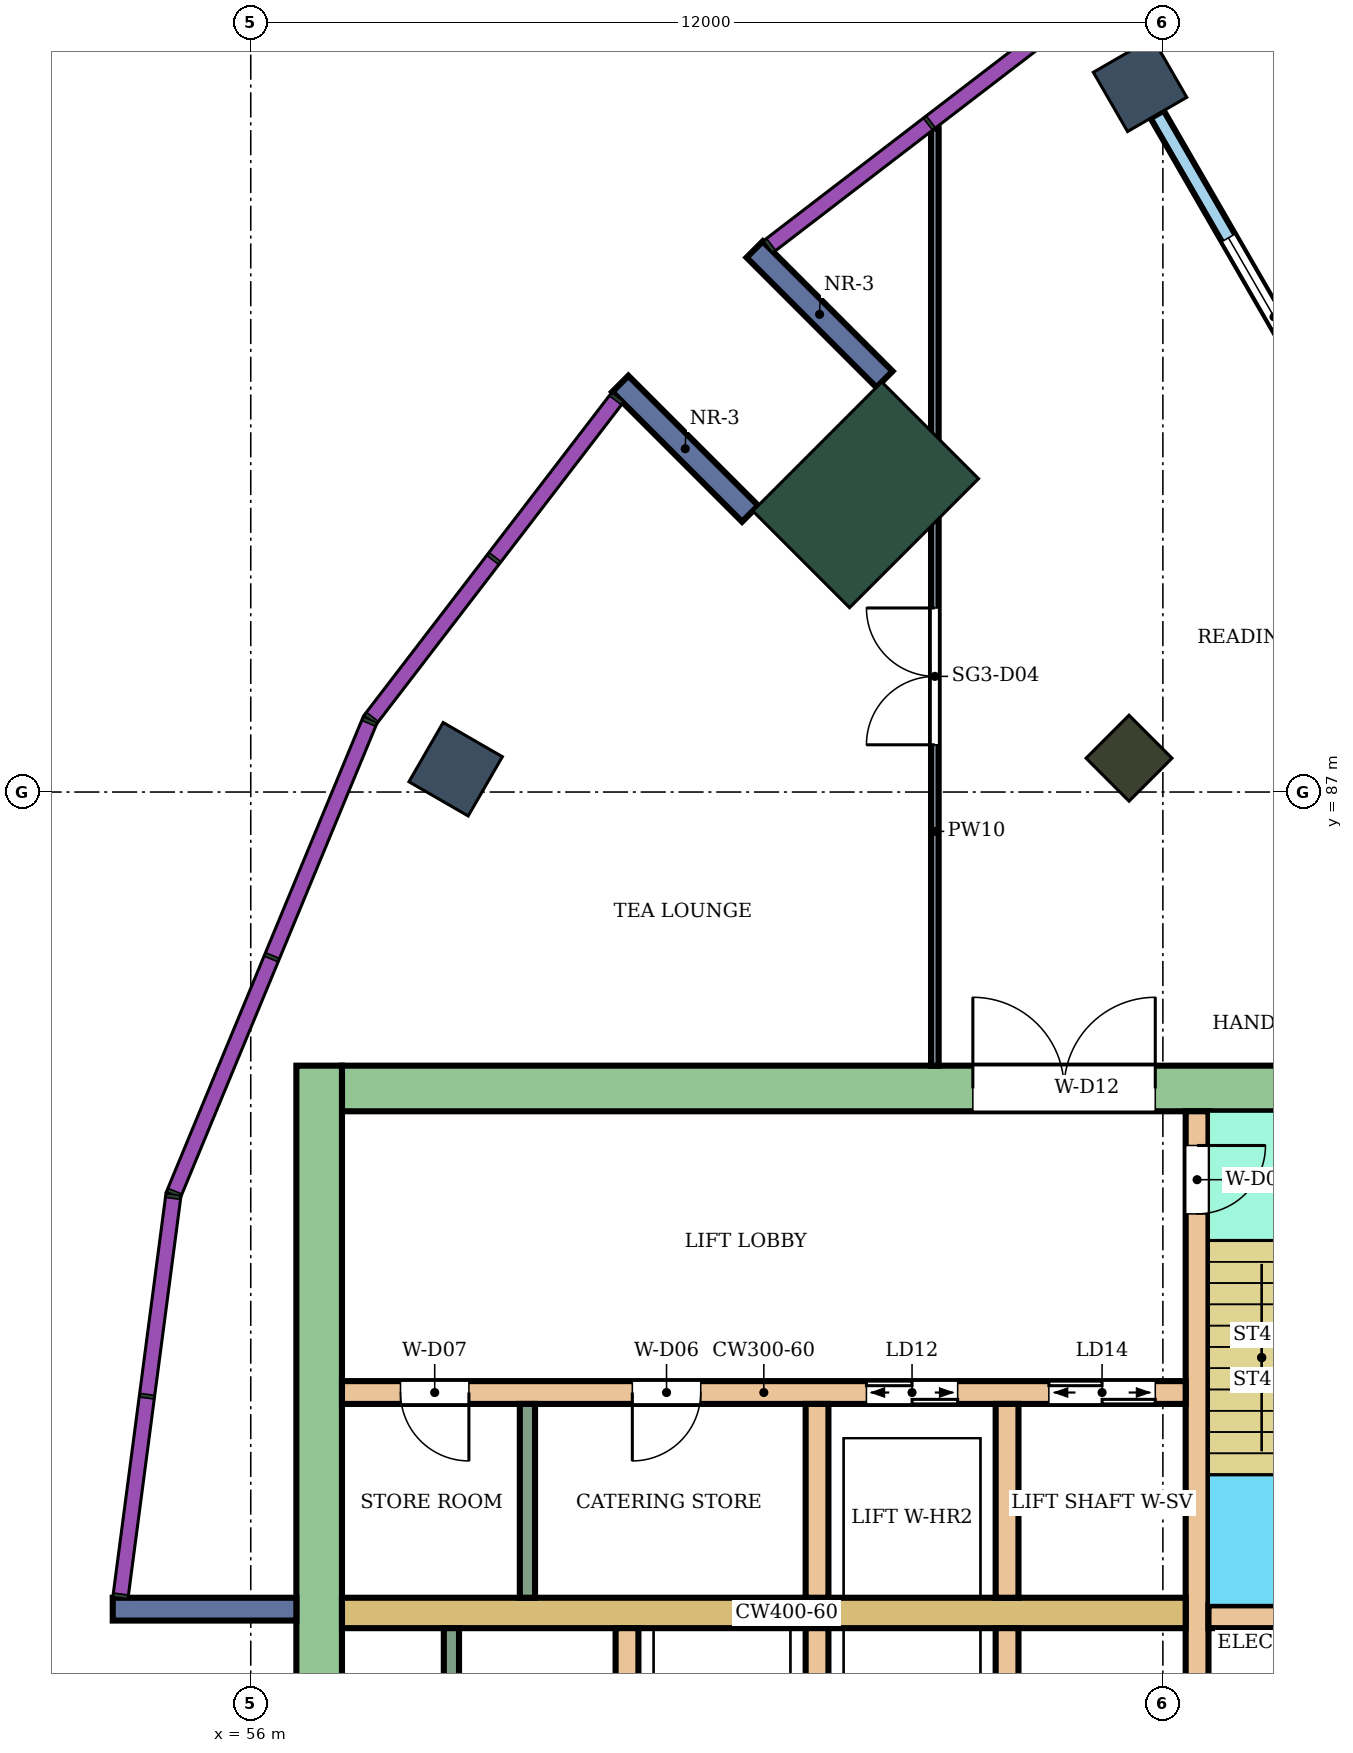
"""IFC4 building model, lengths in metres.
Left out: names, types, materials, properties, quantities, classifications, styles, units other than length and angle.
Written with IfcOpenShell. Run it as: python <this file> out.ifc"""

import sys

from ifc_helpers import new_model, si_unit, direction, frame, frame_2d, origin, origin_2d, place, context, subcontext, project, spatial, rectangle, extrude, element, fill, save


model = new_model("IFC4")
c1 = context("Model", 3, precision=1e-05, world=origin(), true_north=direction((0.0, 1.0)))
c2 = subcontext(c1, "Body", "Model", "MODEL_VIEW")
j1 = project(units=[si_unit("LENGTHUNIT", "METRE"), si_unit("PLANEANGLEUNIT", "RADIAN")], contexts=[c1])
p1 = place(None, origin())
s1 = spatial("IfcSite", under=j1, at=p1, CompositionType="ELEMENT")
p2 = place(p1, origin())
s2 = spatial("IfcBuilding", under=s1, at=p2, CompositionType="ELEMENT")
p3 = place(p2, frame((0.0, 0.0, 229.3)))
s3 = spatial("IfcBuildingStorey", under=s2, at=p3, CompositionType="ELEMENT", Elevation=229.3)
for number, where, z_axis, x_axis in (
    (1, (67.7, 96.304, 0.0), (0.0, 0.0, 1.0), (-0.5, 0.866, 0.0)),
    (2, (58.696, 87.3, 0.0), (0.0, 0.0, 1.0), (-0.866, 0.5, 0.0)),
):
    element("IfcColumn", number, at=place(p3, frame(where, z_axis=z_axis, x_axis=x_axis)), inside=s3, PredefinedType="COLUMN", context=c2, shape_type="SweptSolid", body=[
        extrude(rectangle(XDim=0.9, YDim=0.9, at=origin_2d()), origin(), (0.0, 0.0, 1.0), 8.0),
    ])
p4 = place(p3, frame((67.555, 87.445, 0.0), z_axis=(0.0, 0.0, 1.0), x_axis=(-0.707106781187, 0.707106781187, 0.0)))
e3 = element("IfcColumn", 3, at=p4, inside=s3, PredefinedType="COLUMN", context=c2, shape_type="SweptSolid", body=[
    extrude(rectangle(XDim=0.8, YDim=0.8, at=origin_2d()), origin(), (0.0, 0.0, 1.0), 8.0),
])
p5 = place(p3, frame((64.09, 90.91, 0.0), z_axis=(0.0, 0.0, 1.0), x_axis=(-0.707106781187, 0.707106781187, 0.0)))
e4 = element("IfcColumn", 4, at=p5, inside=s3, PredefinedType="COLUMN", context=c2, shape_type="SweptSolid", body=[
    extrude(rectangle(XDim=1.8, YDim=2.4, at=origin_2d()), origin(), (0.0, 0.0, 1.0), 8.0),
])
p6 = place(p3, frame((72.1, 83.1, 0.0), z_axis=(0.0, 0.0, 1.0), x_axis=(-1.0, 0.0, 0.0)))
e5 = element("IfcWall", 5, at=p6, inside=s3, PredefinedType="SHEAR", context=c2, shape_type="SweptSolid", body=[
    extrude(rectangle(XDim=14.9, YDim=0.6, at=frame_2d((7.45, 0.0))), origin(), (0.0, 0.0, 1.0), 7.68),
])
p7 = place(p6, frame((4.2, 0.0, 0.0)))
e6 = element("IfcOpeningElement", 6, at=p7, cuts=e5, PredefinedType="OPENING", context=c2, shape_type="SweptSolid", body=[
    extrude(rectangle(XDim=2.4, YDim=2.4, at=frame_2d((1.2, 1.2))), frame((0.0, 0.31, 0.0), z_axis=(0.0, -1.0, 0.0), x_axis=(1.0, 0.0, 0.0)), (0.0, 0.0, 1.0), 0.62),
])
p8 = place(p3, frame((56.9, 83.4, 0.0), z_axis=(0.0, 0.0, 1.0), x_axis=(0.0, -1.0, 0.0)))
e7 = element("IfcWall", 7, at=p8, inside=s3, PredefinedType="SHEAR", context=c2, shape_type="SweptSolid", body=[
    extrude(rectangle(XDim=16.8, YDim=0.6, at=frame_2d((8.4, 0.0))), origin(), (0.0, 0.0, 1.0), 7.68),
])
p9 = place(p3, frame((68.45, 82.8, 0.0), z_axis=(0.0, 0.0, 1.0), x_axis=(0.0, -1.0, 0.0)))
e8 = element("IfcWall", 8, at=p9, inside=s3, PredefinedType="SHEAR", context=c2, shape_type="SweptSolid", body=[
    extrude(rectangle(XDim=7.8, YDim=0.3, at=frame_2d((3.9, 0.0))), origin(), (0.0, 0.0, 1.0), 7.68),
])
p10 = place(p9, frame((0.45, 0.0, 0.0)))
e9 = element("IfcOpeningElement", 9, at=p10, cuts=e8, PredefinedType="OPENING", context=c2, shape_type="SweptSolid", body=[
    extrude(rectangle(XDim=0.9, YDim=2.1, at=frame_2d((0.45, 1.05))), frame((0.0, 0.16, 0.0), z_axis=(0.0, -1.0, 0.0), x_axis=(1.0, 0.0, 0.0)), (0.0, 0.0, 1.0), 0.32),
])
p11 = place(p3, frame((71.65, 76.15, 0.0), z_axis=(0.0, 0.0, 1.0), x_axis=(-1.0, 0.0, 0.0)))
e10 = element("IfcWall", 10, at=p11, inside=s3, PredefinedType="SHEAR", context=c2, shape_type="SweptSolid", body=[
    extrude(rectangle(XDim=3.05, YDim=0.3, at=frame_2d((1.525, 0.0))), origin(), (0.0, 0.0, 1.0), 7.68),
])
p12 = place(p3, frame((68.3, 76.2, 0.0), z_axis=(0.0, 0.0, 1.0), x_axis=(-1.0, 0.0, 0.0)))
e11 = element("IfcWall", 11, at=p12, inside=s3, PredefinedType="SHEAR", context=c2, shape_type="SweptSolid", body=[
    extrude(rectangle(XDim=11.1, YDim=0.4, at=frame_2d((5.55, 0.0))), origin(), (0.0, 0.0, 1.0), 7.68),
])
p13 = place(p3, frame((68.3, 79.1, 0.0), z_axis=(0.0, 0.0, 1.0), x_axis=(-1.0, 0.0, 0.0)))
e12 = element("IfcWall", 12, at=p13, inside=s3, PredefinedType="SHEAR", context=c2, shape_type="SweptSolid", body=[
    extrude(rectangle(XDim=11.1, YDim=0.3, at=frame_2d((5.55, 0.0))), origin(), (0.0, 0.0, 1.0), 7.68),
])
p14 = place(p13, frame((0.4, 0.0, 0.0)))
e13 = element("IfcOpeningElement", 13, at=p14, cuts=e12, PredefinedType="OPENING", context=c2, shape_type="SweptSolid", body=[
    extrude(rectangle(XDim=1.4, YDim=2.1, at=frame_2d((0.7, 1.05))), frame((0.0, 0.16, 0.0), z_axis=(0.0, -1.0, 0.0), x_axis=(1.0, 0.0, 0.0)), (0.0, 0.0, 1.0), 0.32),
])
p15 = place(p13, frame((3.0, 0.0, 0.0)))
e14 = element("IfcOpeningElement", 14, at=p15, cuts=e12, PredefinedType="OPENING", context=c2, shape_type="SweptSolid", body=[
    extrude(rectangle(XDim=1.2, YDim=2.1, at=frame_2d((0.6, 1.05))), frame((0.0, 0.16, 0.0), z_axis=(0.0, -1.0, 0.0), x_axis=(1.0, 0.0, 0.0)), (0.0, 0.0, 1.0), 0.32),
])
p16 = place(p13, frame((6.38, 0.0, 0.0)))
e15 = element("IfcOpeningElement", 15, at=p16, cuts=e12, PredefinedType="OPENING", context=c2, shape_type="SweptSolid", body=[
    extrude(rectangle(XDim=0.9, YDim=2.1, at=frame_2d((0.45, 1.05))), frame((0.0, 0.16, 0.0), z_axis=(0.0, -1.0, 0.0), x_axis=(1.0, 0.0, 0.0)), (0.0, 0.0, 1.0), 0.32),
])
p17 = place(p13, frame((9.43, 0.0, 0.0)))
e16 = element("IfcOpeningElement", 16, at=p17, cuts=e12, PredefinedType="OPENING", context=c2, shape_type="SweptSolid", body=[
    extrude(rectangle(XDim=0.9, YDim=2.1, at=frame_2d((0.45, 1.05))), frame((0.0, 0.16, 0.0), z_axis=(0.0, -1.0, 0.0), x_axis=(1.0, 0.0, 0.0)), (0.0, 0.0, 1.0), 0.32),
])
for number, where, z_axis, x_axis in (
    (17, (65.95, 76.0, 0.0), (0.0, 0.0, 1.0), (0.0, -1.0, 0.0)),
    (18, (63.45, 76.0, 0.0), (0.0, 0.0, 1.0), (0.0, -1.0, 0.0)),
    (19, (60.95, 76.0, 0.0), (0.0, 0.0, 1.0), (0.0, -1.0, 0.0)),
    (20, (65.95, 78.95, 0.0), (0.0, 0.0, 1.0), (0.0, -1.0, 0.0)),
    (21, (63.45, 78.95, 0.0), (0.0, 0.0, 1.0), (0.0, -1.0, 0.0)),
):
    element("IfcWall", number, at=place(p3, frame(where, z_axis=z_axis, x_axis=x_axis)), inside=s3, PredefinedType="SHEAR", context=c2, shape_type="SweptSolid", body=[
        extrude(rectangle(XDim=2.55, YDim=0.3, at=frame_2d((1.275, 0.0))), origin(), (0.0, 0.0, 1.0), 7.68),
    ])
for number, where, z_axis, x_axis in (
    (22, (64.338, 92.43, 0.0), (0.0, 0.0, 1.0), (-0.707, 0.707, 0.0)),
    (23, (62.57, 90.662, 0.0), (0.0, 0.0, 1.0), (-0.707, 0.707, 0.0)),
    (24, (56.6, 76.25, 0.0), (0.0, 0.0, 1.0), (-1.0, 0.0, 0.0)),
):
    element("IfcWall", number, at=place(p3, frame(where, z_axis=z_axis, x_axis=x_axis)), inside=s3, PredefinedType="NOTDEFINED", context=c2, shape_type="SweptSolid", body=[
        extrude(rectangle(XDim=2.416, YDim=0.3, at=frame_2d((1.208, 0.0))), origin(), (0.0, 0.0, 1.0), 8.0),
    ])
p18 = place(p3, frame((71.0, 90.588, 0.0), z_axis=(0.0, 0.0, 1.0), x_axis=(-0.499985903289, 0.866033542371, 0.0)))
e25 = element("IfcWall", 25, at=p18, inside=s3, PredefinedType="NOTDEFINED", context=c2, shape_type="SweptSolid", body=[
    extrude(rectangle(XDim=6.15, YDim=0.2, at=frame_2d((3.075, 0.0))), origin(), (0.0, 0.0, 1.0), 8.0),
])
p19 = place(p18, frame((1.875, 0.0, 0.3)))
e26 = element("IfcOpeningElement", 26, at=p19, cuts=e25, PredefinedType="OPENING", context=c2, shape_type="SweptSolid", body=[
    extrude(rectangle(XDim=2.4, YDim=3.6, at=frame_2d((1.2, 1.8))), frame((0.0, 0.11, 0.0), z_axis=(0.0, -1.0, 0.0), x_axis=(1.0, 0.0, 0.0)), (0.0, 0.0, 1.0), 0.22),
])
p20 = place(p3, frame((65.0, 83.4, 0.0), z_axis=(0.0, 0.0, 1.0), x_axis=(0.0, 1.0, 0.0)))
e27 = element("IfcWall", 27, at=p20, inside=s3, PredefinedType="PARTITIONING", context=c2, shape_type="SweptSolid", body=[
    extrude(rectangle(XDim=12.33, YDim=0.1, at=frame_2d((6.165, 0.0))), origin(), (0.0, 0.0, 1.0), 7.55),
])
p21 = place(p20, frame((4.221, 0.0, 0.0)))
e28 = element("IfcOpeningElement", 28, at=p21, cuts=e27, PredefinedType="OPENING", context=c2, shape_type="SweptSolid", body=[
    extrude(rectangle(XDim=1.8, YDim=2.1, at=frame_2d((0.9, 1.05))), frame((0.0, 0.06, 0.0), z_axis=(0.0, -1.0, 0.0), x_axis=(1.0, 0.0, 0.0)), (0.0, 0.0, 1.0), 0.12),
])
for number, where, z_axis, x_axis in (
    (29, (58.64, 76.0, 0.0), (0.0, 0.0, 1.0), (0.0, -1.0, 0.0)),
    (30, (59.64, 78.95, 0.0), (0.0, 0.0, 1.0), (0.0, -1.0, 0.0)),
):
    element("IfcWall", number, at=place(p3, frame(where, z_axis=z_axis, x_axis=x_axis)), inside=s3, PredefinedType="PARTITIONING", context=c2, shape_type="SweptSolid", body=[
        extrude(rectangle(XDim=2.55, YDim=0.2, at=frame_2d((1.275, 0.0))), origin(), (0.0, 0.0, 1.0), 7.68),
    ])
p22 = place(p19, origin())
e31 = element("IfcWindow", 31, at=p22, inside=s3, PartitioningType="SINGLE_PANEL", PredefinedType="WINDOW", context=c2, shape_type="SweptSolid", body=[
    extrude(rectangle(XDim=2.4, YDim=3.6, at=frame_2d((1.2, 1.8))), frame((0.0, 0.03, 0.0), z_axis=(0.0, -1.0, 0.0), x_axis=(1.0, 0.0, 0.0)), (0.0, 0.0, 1.0), 0.06),
])
fill(e26, e31)
p23 = place(p21, origin())
e32 = element("IfcDoor", 32, at=p23, inside=s3, OperationType="DOUBLE_DOOR_SINGLE_SWING", PredefinedType="DOOR", context=c2, shape_type="SweptSolid", body=[
    extrude(rectangle(XDim=1.8, YDim=2.1, at=frame_2d((0.9, 1.05))), frame((0.0, 0.025, 0.0), z_axis=(0.0, -1.0, 0.0), x_axis=(1.0, 0.0, 0.0)), (0.0, 0.0, 1.0), 0.05),
])
fill(e28, e32)
p24 = place(p10, origin())
e33 = element("IfcDoor", 33, at=p24, inside=s3, OperationType="SINGLE_SWING_LEFT", PredefinedType="DOOR", context=c2, shape_type="SweptSolid", body=[
    extrude(rectangle(XDim=0.9, YDim=2.1, at=frame_2d((0.45, 1.05))), frame((0.0, 0.025, 0.0), z_axis=(0.0, -1.0, 0.0), x_axis=(1.0, 0.0, 0.0)), (0.0, 0.0, 1.0), 0.05),
])
fill(e9, e33)
p25 = place(p14, origin())
e34 = element("IfcDoor", 34, at=p25, inside=s3, OperationType="DOUBLE_DOOR_SLIDING", PredefinedType="DOOR", context=c2, shape_type="SweptSolid", body=[
    extrude(rectangle(XDim=1.4, YDim=2.1, at=frame_2d((0.7, 1.05))), frame((0.0, 0.025, 0.0), z_axis=(0.0, -1.0, 0.0), x_axis=(1.0, 0.0, 0.0)), (0.0, 0.0, 1.0), 0.05),
])
fill(e13, e34)
p26 = place(p15, origin())
e35 = element("IfcDoor", 35, at=p26, inside=s3, OperationType="DOUBLE_DOOR_SLIDING", PredefinedType="DOOR", context=c2, shape_type="SweptSolid", body=[
    extrude(rectangle(XDim=1.2, YDim=2.1, at=frame_2d((0.6, 1.05))), frame((0.0, 0.025, 0.0), z_axis=(0.0, -1.0, 0.0), x_axis=(1.0, 0.0, 0.0)), (0.0, 0.0, 1.0), 0.05),
])
fill(e14, e35)
p27 = place(p16, origin())
e36 = element("IfcDoor", 36, at=p27, inside=s3, OperationType="SINGLE_SWING_RIGHT", PredefinedType="DOOR", context=c2, shape_type="SweptSolid", body=[
    extrude(rectangle(XDim=0.9, YDim=2.1, at=frame_2d((0.45, 1.05))), frame((0.0, 0.025, 0.0), z_axis=(0.0, -1.0, 0.0), x_axis=(1.0, 0.0, 0.0)), (0.0, 0.0, 1.0), 0.05),
])
fill(e15, e36)
p28 = place(p17, origin())
e37 = element("IfcDoor", 37, at=p28, inside=s3, OperationType="SINGLE_SWING_LEFT", PredefinedType="DOOR", context=c2, shape_type="SweptSolid", body=[
    extrude(rectangle(XDim=0.9, YDim=2.1, at=frame_2d((0.45, 1.05))), frame((0.0, 0.025, 0.0), z_axis=(0.0, -1.0, 0.0), x_axis=(1.0, 0.0, 0.0)), (0.0, 0.0, 1.0), 0.05),
])
fill(e16, e37)
p29 = place(p7, frame((2.4, 0.0, 0.0), z_axis=(0.0, 0.0, 1.0), x_axis=(-1.0, 0.0, 0.0)))
e38 = element("IfcDoor", 38, at=p29, inside=s3, OperationType="DOUBLE_DOOR_SINGLE_SWING", PredefinedType="DOOR", context=c2, shape_type="SweptSolid", body=[
    extrude(rectangle(XDim=2.4, YDim=2.4, at=frame_2d((1.2, 1.2))), frame((0.0, 0.025, 0.0), z_axis=(0.0, -1.0, 0.0), x_axis=(1.0, 0.0, 0.0)), (0.0, 0.0, 1.0), 0.05),
])
fill(e6, e38)
save(model, sys.argv[1])
